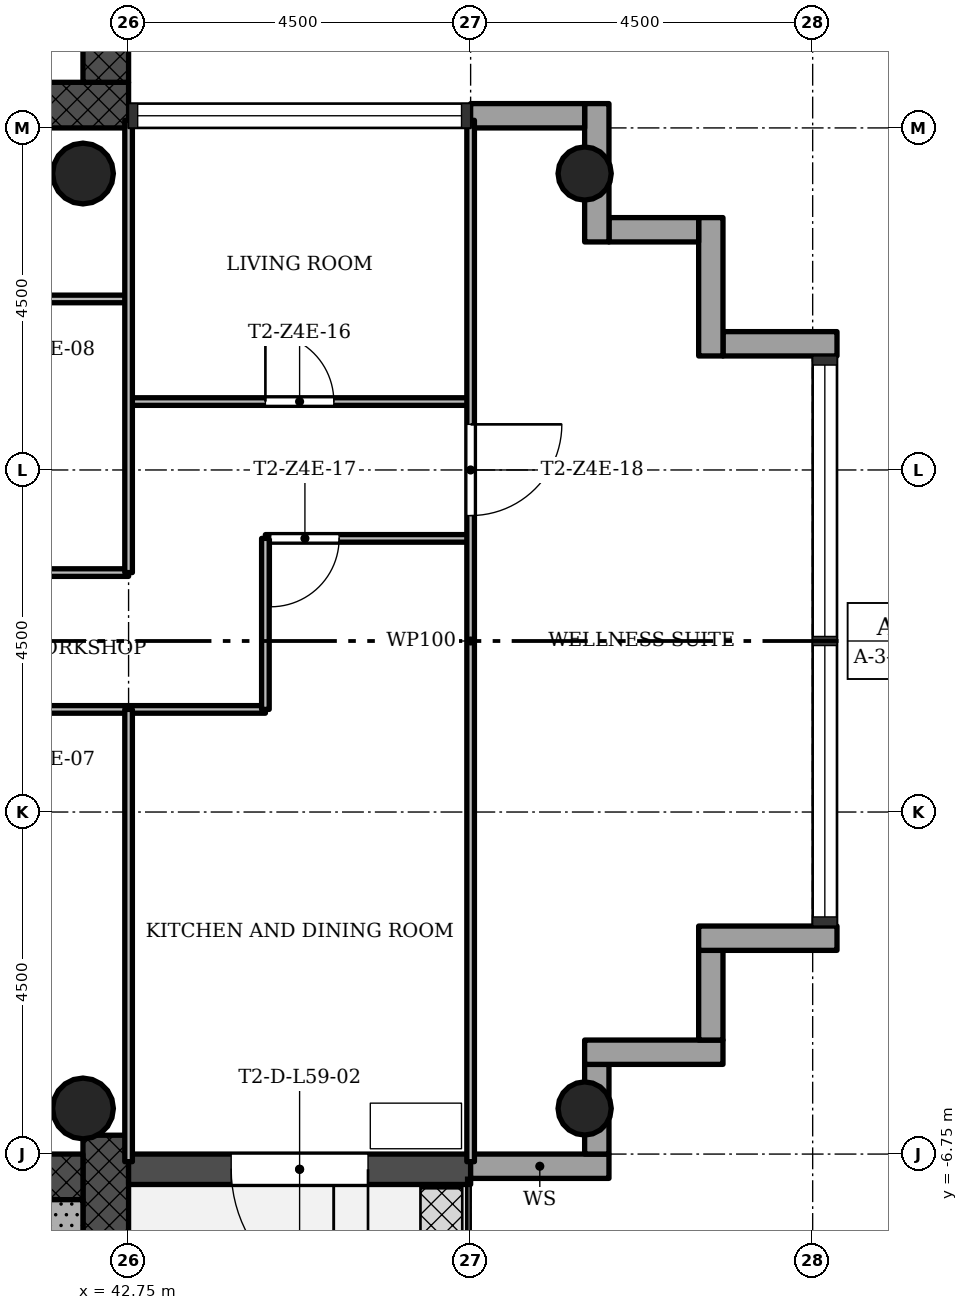
"""IFC4 building model, lengths in metres.
Left out: names, types, materials, properties, quantities, classifications, styles, units other than length and angle.
Written with IfcOpenShell. Run it as: python <this file> out.ifc"""

import sys

from ifc_helpers import new_model, si_unit, direction, frame, frame_2d, origin, origin_2d, place, context, subcontext, project, spatial, rectangle, hollow_circle, extrude, element, fill, save


model = new_model("IFC4")
c1 = context("Model", 3, precision=1e-05, world=origin(), true_north=direction((0.0, 1.0)))
c2 = subcontext(c1, "Body", "Model", "MODEL_VIEW")
j1 = project(units=[si_unit("LENGTHUNIT", "METRE"), si_unit("PLANEANGLEUNIT", "RADIAN")], contexts=[c1])
p1 = place(None, origin())
s1 = spatial("IfcSite", under=j1, at=p1, CompositionType="ELEMENT")
p2 = place(p1, origin())
s2 = spatial("IfcBuilding", under=s1, at=p2, CompositionType="ELEMENT")
p3 = place(p2, frame((0.0, 0.0, 213.0)))
s3 = spatial("IfcBuildingStorey", under=s2, at=p3, CompositionType="ELEMENT", Elevation=213.0)
p4 = place(p3, frame((29.85, 7.05, 0.0), z_axis=(0.0, 0.0, 1.0), x_axis=(1.0, 0.0, 0.0)))
e1 = element("IfcWall", 1, at=p4, inside=s3, PredefinedType="SHEAR", context=c2, shape_type="SweptSolid", body=[
    extrude(rectangle(XDim=12.9, YDim=0.6, at=frame_2d((6.45, 0.0))), origin(), (0.0, 0.0, 1.0), 3.4),
])
p5 = place(p4, frame((5.25, 0.0, 0.0)))
e2 = element("IfcOpeningElement", 2, at=p5, cuts=e1, PredefinedType="OPENING", context=c2, shape_type="SweptSolid", body=[
    extrude(rectangle(XDim=1.8, YDim=2.1, at=frame_2d((0.9, 1.05))), frame((0.0, 0.31, 0.0), z_axis=(0.0, -1.0, 0.0), x_axis=(1.0, 0.0, 0.0)), (0.0, 0.0, 1.0), 0.62),
])
p6 = place(p3, frame((42.45, 7.35, 0.0), z_axis=(0.0, 0.0, 1.0), x_axis=(0.0, 1.0, 0.0)))
e3 = element("IfcWall", 3, at=p6, inside=s3, PredefinedType="SHEAR", context=c2, shape_type="SweptSolid", body=[
    extrude(rectangle(XDim=8.4, YDim=0.6, at=frame_2d((4.2, 0.0))), origin(), (0.0, 0.0, 1.0), 3.4),
])
p7 = place(p3, frame((42.45, -15.15, 0.0), z_axis=(0.0, 0.0, 1.0), x_axis=(0.0, 1.0, 0.0)))
e4 = element("IfcWall", 4, at=p7, inside=s3, PredefinedType="SHEAR", context=c2, shape_type="SweptSolid", body=[
    extrude(rectangle(XDim=8.648, YDim=0.6, at=frame_2d((4.324, 0.0))), origin(), (0.0, 0.0, 1.0), 3.4),
])
p8 = place(p3, frame((42.15, -7.05, 0.0), z_axis=(0.0, 0.0, 1.0), x_axis=(-1.0, 0.0, 0.0)))
e5 = element("IfcWall", 5, at=p8, inside=s3, PredefinedType="SHEAR", context=c2, shape_type="SweptSolid", body=[
    extrude(rectangle(XDim=12.9, YDim=0.6, at=frame_2d((6.45, 0.0))), origin(), (0.0, 0.0, 1.0), 3.4),
])
p9 = place(p8, frame((5.25, 0.0, 0.0)))
e6 = element("IfcOpeningElement", 6, at=p9, cuts=e5, PredefinedType="OPENING", context=c2, shape_type="SweptSolid", body=[
    extrude(rectangle(XDim=1.8, YDim=2.1, at=frame_2d((0.9, 1.05))), frame((0.0, 0.31, 0.0), z_axis=(0.0, -1.0, 0.0), x_axis=(1.0, 0.0, 0.0)), (0.0, 0.0, 1.0), 0.62),
])
for number, where, z_axis, x_axis in (
    (7, (48.75, -6.15, 0.0), (0.0, 0.0, 1.0), (1.0, 0.0, 0.0)),
    (8, (48.75, 6.15, 0.0), (0.0, 0.0, 1.0), (1.0, 0.0, 0.0)),
):
    element("IfcColumn", number, at=place(p3, frame(where, z_axis=z_axis, x_axis=x_axis)), inside=s3, PredefinedType="COLUMN", context=c2, shape_type="SweptSolid", body=[
        extrude(hollow_circle(Radius=0.35, WallThickness=0.025, at=origin_2d()), origin(), (0.0, 0.0, 1.0), 3.4),
    ])
for number, where, z_axis, x_axis in (
    (9, (42.15, -6.15, 0.0), (0.0, 0.0, 1.0), (1.0, 0.0, 0.0)),
    (10, (42.15, 6.15, 0.0), (0.0, 0.0, 1.0), (1.0, 0.0, 0.0)),
):
    element("IfcColumn", number, at=place(p3, frame(where, z_axis=z_axis, x_axis=x_axis)), inside=s3, PredefinedType="COLUMN", context=c2, shape_type="SweptSolid", body=[
        extrude(hollow_circle(Radius=0.4, WallThickness=0.028, at=origin_2d()), origin(), (0.0, 0.0, 1.0), 3.4),
    ])
p10 = place(p3, frame((42.75, -6.95, -0.02), z_axis=(0.0, 0.0, 1.0), x_axis=(1.0, 0.0, 0.0)))
e11 = element("IfcWall", 11, at=p10, inside=s3, PredefinedType="STANDARD", context=c2, shape_type="SweptSolid", body=[
    extrude(rectangle(XDim=4.5, YDim=0.4, at=frame_2d((2.25, 0.0))), origin(), (0.0, 0.0, 1.0), 3.12),
])
p11 = place(p10, frame((1.35, 0.0, 0.02)))
e12 = element("IfcOpeningElement", 12, at=p11, cuts=e11, PredefinedType="OPENING", context=c2, shape_type="SweptSolid", body=[
    extrude(rectangle(XDim=1.8, YDim=2.1, at=frame_2d((0.9, 1.05))), frame((0.0, 0.21, 0.0), z_axis=(0.0, -1.0, 0.0), x_axis=(1.0, 0.0, 0.0)), (0.0, 0.0, 1.0), 0.42),
])
p12 = place(p3, frame((47.25, -6.91, -0.3), z_axis=(0.0, 0.0, 1.0), x_axis=(1.0, 0.0, 0.0)))
e13 = element("IfcWall", 13, at=p12, inside=s3, PredefinedType="STANDARD", context=c2, shape_type="SweptSolid", body=[
    extrude(rectangle(XDim=1.82, YDim=0.32, at=frame_2d((0.91, 0.0))), origin(), (0.0, 0.0, 1.0), 3.4),
])
p13 = place(p3, frame((48.91, -6.75, -0.3), z_axis=(0.0, 0.0, 1.0), x_axis=(0.0, 1.0, 0.0)))
e14 = element("IfcWall", 14, at=p13, inside=s3, PredefinedType="STANDARD", context=c2, shape_type="SweptSolid", body=[
    extrude(rectangle(XDim=1.18, YDim=0.32, at=frame_2d((0.59, 0.0))), origin(), (0.0, 0.0, 1.0), 3.4),
])
p14 = place(p3, frame((48.75, -5.41, -0.3), z_axis=(0.0, 0.0, 1.0), x_axis=(1.0, 0.0, 0.0)))
e15 = element("IfcWall", 15, at=p14, inside=s3, PredefinedType="STANDARD", context=c2, shape_type="SweptSolid", body=[
    extrude(rectangle(XDim=1.82, YDim=0.32, at=frame_2d((0.91, 0.0))), origin(), (0.0, 0.0, 1.0), 3.4),
])
p15 = place(p3, frame((50.41, -5.25, -0.3), z_axis=(0.0, 0.0, 1.0), x_axis=(0.0, 1.0, 0.0)))
e16 = element("IfcWall", 16, at=p15, inside=s3, PredefinedType="STANDARD", context=c2, shape_type="SweptSolid", body=[
    extrude(rectangle(XDim=1.18, YDim=0.32, at=frame_2d((0.59, 0.0))), origin(), (0.0, 0.0, 1.0), 3.4),
])
p16 = place(p3, frame((50.25, -3.91, -0.3), z_axis=(0.0, 0.0, 1.0), x_axis=(1.0, 0.0, 0.0)))
e17 = element("IfcWall", 17, at=p16, inside=s3, PredefinedType="STANDARD", context=c2, shape_type="SweptSolid", body=[
    extrude(rectangle(XDim=1.82, YDim=0.32, at=frame_2d((0.91, 0.0))), origin(), (0.0, 0.0, 1.0), 3.4),
])
p17 = place(p3, frame((52.07, 3.91, -0.3), z_axis=(0.0, 0.0, 1.0), x_axis=(-1.0, 0.0, 0.0)))
e18 = element("IfcWall", 18, at=p17, inside=s3, PredefinedType="STANDARD", context=c2, shape_type="SweptSolid", body=[
    extrude(rectangle(XDim=1.5, YDim=0.32, at=frame_2d((0.75, 0.0))), origin(), (0.0, 0.0, 1.0), 3.4),
])
p18 = place(p3, frame((50.41, 3.75, -0.3), z_axis=(0.0, 0.0, 1.0), x_axis=(0.0, 1.0, 0.0)))
e19 = element("IfcWall", 19, at=p18, inside=s3, PredefinedType="STANDARD", context=c2, shape_type="SweptSolid", body=[
    extrude(rectangle(XDim=1.82, YDim=0.32, at=frame_2d((0.91, 0.0))), origin(), (0.0, 0.0, 1.0), 3.4),
])
p19 = place(p3, frame((50.25, 5.41, -0.3), z_axis=(0.0, 0.0, 1.0), x_axis=(-1.0, 0.0, 0.0)))
e20 = element("IfcWall", 20, at=p19, inside=s3, PredefinedType="STANDARD", context=c2, shape_type="SweptSolid", body=[
    extrude(rectangle(XDim=1.18, YDim=0.32, at=frame_2d((0.59, 0.0))), origin(), (0.0, 0.0, 1.0), 3.4),
])
p20 = place(p3, frame((48.91, 5.25, -0.3), z_axis=(0.0, 0.0, 1.0), x_axis=(0.0, 1.0, 0.0)))
e21 = element("IfcWall", 21, at=p20, inside=s3, PredefinedType="STANDARD", context=c2, shape_type="SweptSolid", body=[
    extrude(rectangle(XDim=1.82, YDim=0.32, at=frame_2d((0.91, 0.0))), origin(), (0.0, 0.0, 1.0), 3.4),
])
p21 = place(p3, frame((48.75, 6.91, -0.3), z_axis=(0.0, 0.0, 1.0), x_axis=(-1.0, 0.0, 0.0)))
e22 = element("IfcWall", 22, at=p21, inside=s3, PredefinedType="STANDARD", context=c2, shape_type="SweptSolid", body=[
    extrude(rectangle(XDim=1.5, YDim=0.32, at=frame_2d((0.75, 0.0))), origin(), (0.0, 0.0, 1.0), 3.4),
])
p22 = place(p3, frame((44.55, -0.9, 0.0), z_axis=(0.0, 0.0, 1.0), x_axis=(-1.0, 0.0, 0.0)))
e23 = element("IfcWall", 23, at=p22, inside=s3, PredefinedType="PARTITIONING", context=c2, shape_type="SweptSolid", body=[
    extrude(rectangle(XDim=4.05, YDim=0.1, at=frame_2d((2.025, 0.0))), origin(), (0.0, 0.0, 1.0), 3.0),
])
p23 = place(p3, frame((42.75, 0.9, 0.0), z_axis=(0.0, 0.0, 1.0), x_axis=(-1.0, 0.0, 0.0)))
e24 = element("IfcWall", 24, at=p23, inside=s3, PredefinedType="PARTITIONING", context=c2, shape_type="SweptSolid", body=[
    extrude(rectangle(XDim=2.25, YDim=0.1, at=frame_2d((1.125, 0.0))), origin(), (0.0, 0.0, 1.0), 3.0),
])
p24 = place(p3, frame((47.25, 1.35, 0.0), z_axis=(0.0, 0.0, 1.0), x_axis=(-1.0, 0.0, 0.0)))
e25 = element("IfcWall", 25, at=p24, inside=s3, PredefinedType="PARTITIONING", context=c2, shape_type="SweptSolid", body=[
    extrude(rectangle(XDim=2.7, YDim=0.1, at=frame_2d((1.35, 0.0))), origin(), (0.0, 0.0, 1.0), 3.0),
])
p25 = place(p24, frame((1.73, 0.0, 0.0)))
e26 = element("IfcOpeningElement", 26, at=p25, cuts=e25, PredefinedType="OPENING", context=c2, shape_type="SweptSolid", body=[
    extrude(rectangle(XDim=0.9, YDim=2.1, at=frame_2d((0.45, 1.05))), frame((0.0, 0.06, 0.0), z_axis=(0.0, -1.0, 0.0), x_axis=(1.0, 0.0, 0.0)), (0.0, 0.0, 1.0), 0.12),
])
p26 = place(p3, frame((47.25, 3.15, 0.0), z_axis=(0.0, 0.0, 1.0), x_axis=(-1.0, 0.0, 0.0)))
e27 = element("IfcWall", 27, at=p26, inside=s3, PredefinedType="PARTITIONING", context=c2, shape_type="SweptSolid", body=[
    extrude(rectangle(XDim=4.5, YDim=0.1, at=frame_2d((2.25, 0.0))), origin(), (0.0, 0.0, 1.0), 3.0),
])
p27 = place(p26, frame((1.8, 0.0, 0.0)))
e28 = element("IfcOpeningElement", 28, at=p27, cuts=e27, PredefinedType="OPENING", context=c2, shape_type="SweptSolid", body=[
    extrude(rectangle(XDim=0.9, YDim=2.1, at=frame_2d((0.45, 1.05))), frame((0.0, 0.06, 0.0), z_axis=(0.0, -1.0, 0.0), x_axis=(1.0, 0.0, 0.0)), (0.0, 0.0, 1.0), 0.12),
])
p28 = place(p3, frame((42.75, 4.5, 0.0), z_axis=(0.0, 0.0, 1.0), x_axis=(-1.0, 0.0, 0.0)))
e29 = element("IfcWall", 29, at=p28, inside=s3, PredefinedType="PARTITIONING", context=c2, shape_type="SweptSolid", body=[
    extrude(rectangle(XDim=5.25, YDim=0.1, at=frame_2d((2.625, 0.0))), origin(), (0.0, 0.0, 1.0), 3.0),
])
p29 = place(p28, frame((3.3, 0.0, 0.0)))
e30 = element("IfcOpeningElement", 30, at=p29, cuts=e29, PredefinedType="OPENING", context=c2, shape_type="SweptSolid", body=[
    extrude(rectangle(XDim=0.9, YDim=2.1, at=frame_2d((0.45, 1.05))), frame((0.0, 0.06, 0.0), z_axis=(0.0, -1.0, 0.0), x_axis=(1.0, 0.0, 0.0)), (0.0, 0.0, 1.0), 0.12),
])
p30 = place(p3, frame((47.25, -6.85, 0.0), z_axis=(0.0, 0.0, 1.0), x_axis=(0.0, 1.0, 0.0)))
e31 = element("IfcWall", 31, at=p30, inside=s3, PredefinedType="PARTITIONING", context=c2, shape_type="SweptSolid", body=[
    extrude(rectangle(XDim=13.7, YDim=0.1, at=frame_2d((6.85, 0.0))), origin(), (0.0, 0.0, 1.0), 3.0),
])
p31 = place(p30, frame((8.5, 0.0, 0.0)))
e32 = element("IfcOpeningElement", 32, at=p31, cuts=e31, PredefinedType="OPENING", context=c2, shape_type="SweptSolid", body=[
    extrude(rectangle(XDim=1.2, YDim=2.1, at=frame_2d((0.6, 1.05))), frame((0.0, 0.06, 0.0), z_axis=(0.0, -1.0, 0.0), x_axis=(1.0, 0.0, 0.0)), (0.0, 0.0, 1.0), 0.12),
])
p32 = place(p3, frame((44.55, -0.9, 0.0), z_axis=(0.0, 0.0, 1.0), x_axis=(0.0, 1.0, 0.0)))
e33 = element("IfcWall", 33, at=p32, inside=s3, PredefinedType="PARTITIONING", context=c2, shape_type="SweptSolid", body=[
    extrude(rectangle(XDim=2.25, YDim=0.1, at=frame_2d((1.125, 0.0))), origin(), (0.0, 0.0, 1.0), 3.0),
])
for number, where, z_axis, x_axis in (
    (34, (42.75, -6.85, 0.0), (0.0, 0.0, 1.0), (0.0, 1.0, 0.0)),
    (35, (42.75, 0.9, 0.0), (0.0, 0.0, 1.0), (0.0, 1.0, 0.0)),
):
    element("IfcWall", number, at=place(p3, frame(where, z_axis=z_axis, x_axis=x_axis)), inside=s3, PredefinedType="PARTITIONING", context=c2, shape_type="SweptSolid", body=[
        extrude(rectangle(XDim=5.95, YDim=0.1, at=frame_2d((2.975, 0.0))), origin(), (0.0, 0.0, 1.0), 3.0),
    ])
p33 = place(p3, frame((37.85, -7.65, 0.0), z_axis=(0.0, 0.0, 1.0), x_axis=(1.0, 0.0, 0.0)))
e36 = element("IfcWall", 36, at=p33, inside=s3, PredefinedType="SHEAR", context=c2, shape_type="SweptSolid", body=[
    extrude(rectangle(XDim=4.3, YDim=0.6, at=frame_2d((2.15, 0.0))), origin(), (0.0, 0.0, 1.0), 3.4),
])
p34 = place(p11, origin())
e37 = element("IfcDoor", 37, at=p34, inside=s3, OperationType="SINGLE_SWING_RIGHT", PredefinedType="DOOR", context=c2, shape_type="SweptSolid", body=[
    extrude(rectangle(XDim=1.8, YDim=2.1, at=frame_2d((0.9, 1.05))), frame((0.0, 0.025, 0.0), z_axis=(0.0, -1.0, 0.0), x_axis=(1.0, 0.0, 0.0)), (0.0, 0.0, 1.0), 0.05),
])
fill(e12, e37)
p35 = place(p27, origin())
e38 = element("IfcDoor", 38, at=p35, inside=s3, OperationType="SINGLE_SWING_RIGHT", PredefinedType="DOOR", context=c2, shape_type="SweptSolid", body=[
    extrude(rectangle(XDim=0.9, YDim=2.1, at=frame_2d((0.45, 1.05))), frame((0.0, 0.025, 0.0), z_axis=(0.0, -1.0, 0.0), x_axis=(1.0, 0.0, 0.0)), (0.0, 0.0, 1.0), 0.05),
])
fill(e28, e38)
p36 = place(p25, origin())
e39 = element("IfcDoor", 39, at=p36, inside=s3, OperationType="SINGLE_SWING_LEFT", PredefinedType="DOOR", context=c2, shape_type="SweptSolid", body=[
    extrude(rectangle(XDim=0.9, YDim=2.1, at=frame_2d((0.45, 1.05))), frame((0.0, 0.025, 0.0), z_axis=(0.0, -1.0, 0.0), x_axis=(1.0, 0.0, 0.0)), (0.0, 0.0, 1.0), 0.05),
])
fill(e26, e39)
p37 = place(p31, origin())
e40 = element("IfcDoor", 40, at=p37, inside=s3, OperationType="SINGLE_SWING_RIGHT", PredefinedType="DOOR", context=c2, shape_type="SweptSolid", body=[
    extrude(rectangle(XDim=1.2, YDim=2.1, at=frame_2d((0.6, 1.05))), frame((0.0, 0.025, 0.0), z_axis=(0.0, -1.0, 0.0), x_axis=(1.0, 0.0, 0.0)), (0.0, 0.0, 1.0), 0.05),
])
fill(e32, e40)
save(model, sys.argv[1])
